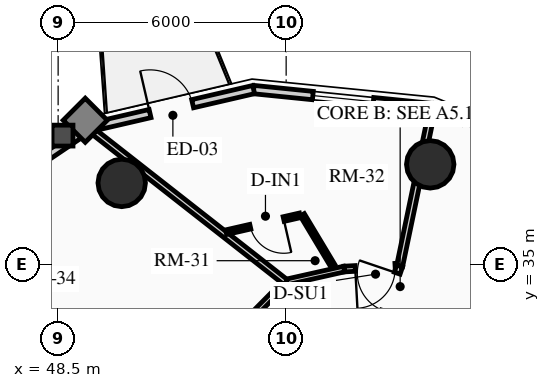
"""IFC4 building model, lengths in metres.
Left out: names, types, materials, properties, quantities, classifications, styles, units other than length and angle.
Written with IfcOpenShell. Run it as: python <this file> out.ifc"""

import sys

from ifc_helpers import new_model, si_unit, direction, frame, frame_2d, origin, origin_2d, place, context, subcontext, project, spatial, rectangle, circle, extrude, source, transform, mapped, element, fill, save


model = new_model("IFC4")
c1 = context("Model", 3, precision=1e-05, world=origin(), true_north=direction((0.0, 1.0)))
c2 = subcontext(c1, "Body", "Model", "MODEL_VIEW")
j1 = project(units=[si_unit("LENGTHUNIT", "METRE"), si_unit("PLANEANGLEUNIT", "RADIAN")], contexts=[c1])
p1 = place(None, origin())
s1 = spatial("IfcSite", under=j1, at=p1, CompositionType="ELEMENT")
p2 = place(p1, origin())
s2 = spatial("IfcBuilding", under=s1, at=p2, CompositionType="ELEMENT")
p3 = place(p2, frame((0.0, 0.0, 177.79)))
s3 = spatial("IfcBuildingStorey", under=s2, at=p3, CompositionType="ELEMENT", Elevation=177.79)
for number, where, z_axis, x_axis in (
    (1, (58.291, 37.635, 0.0), (0.0, 0.0, 1.0), (1.0, 0.0, 0.0)),
    (2, (50.173, 37.146, 0.0), (0.0, 0.0, 1.0), (1.0, 0.0, 0.0)),
):
    element("IfcColumn", number, at=place(p3, frame(where, z_axis=z_axis, x_axis=x_axis)), inside=s3, PredefinedType="USERDEFINED", context=c2, shape_type="SweptSolid", body=[
        extrude(circle(Radius=0.625, at=origin_2d()), origin(), (0.0, 0.0, 1.0), 2.91),
    ])
p4 = place(p3, frame((58.354, 39.127, 0.0), z_axis=(0.0, 0.0, 1.0), x_axis=(0.924556017656, -0.381046152345, 0.0)))
e3 = element("IfcWall", 3, at=p4, inside=s3, PredefinedType="SOLIDWALL", context=c2, shape_type="SweptSolid", body=[
    extrude(rectangle(XDim=0.87, YDim=0.22, at=frame_2d((0.435, 0.0))), origin(), (0.0, 0.0, 1.0), 2.245),
])
p5 = place(p3, frame((53.645, 39.603, 0.0), z_axis=(0.0, 0.0, 1.0), x_axis=(0.994943283129, -0.100438356004, 0.0)))
e4 = element("IfcWall", 4, at=p5, inside=s3, PredefinedType="SOLIDWALL", context=c2, shape_type="SweptSolid", body=[
    extrude(rectangle(XDim=4.733, YDim=0.22, at=frame_2d((2.366, 0.0))), origin(), (0.0, 0.0, 1.0), 2.245),
])
m1 = source(origin(), c2, "Body", "SweptSolid", [
    extrude(rectangle(XDim=1.6, YDim=1.3, at=frame_2d((0.8, 0.65))), frame((0.0, 0.12, 0.0), z_axis=(0.0, -1.0, 0.0), x_axis=(1.0, 0.0, 0.0)), (0.0, 0.0, 1.0), 0.24),
])
p6 = place(p5, frame((1.566, 0.0, 0.65)))
e5 = element("IfcOpeningElement", 5, at=p6, cuts=e4, PredefinedType="OPENING", context=c2, shape_type="MappedRepresentation", body=[
    mapped(m1, transform((0.0, 0.0, 0.0), x_axis=(1.0, 0.0, 0.0), y_axis=(0.0, 1.0, 0.0), z_axis=(0.0, 0.0, 1.0), scale=1.0)),
])
p7 = place(p3, frame((49.313, 38.6, 0.0), z_axis=(0.0, 0.0, 1.0), x_axis=(0.97422620202, 0.22557328587, 0.0)))
e6 = element("IfcWall", 6, at=p7, inside=s3, PredefinedType="SOLIDWALL", context=c2, shape_type="SweptSolid", body=[
    extrude(rectangle(XDim=4.446, YDim=0.22, at=frame_2d((2.223, 0.0))), origin(), (0.0, 0.0, 1.0), 2.245),
])
m2 = source(origin(), c2, "Body", "SweptSolid", [
    extrude(rectangle(XDim=1.15, YDim=2.005, at=frame_2d((0.575, 1.002))), frame((0.0, 0.12, 0.0), z_axis=(0.0, -1.0, 0.0), x_axis=(1.0, 0.0, 0.0)), (0.0, 0.0, 1.0), 0.24),
])
p8 = place(p7, frame((1.648, 0.0, 0.0)))
e7 = element("IfcOpeningElement", 7, at=p8, cuts=e6, PredefinedType="OPENING", context=c2, shape_type="MappedRepresentation", body=[
    mapped(m2, transform((0.0, 0.0, 0.0), x_axis=(1.0, 0.0, 0.0), y_axis=(0.0, 1.0, 0.0), z_axis=(0.0, 0.0, 1.0), scale=1.0)),
])
p9 = place(p3, frame((45.783, 36.217, 0.0), z_axis=(0.0, 0.0, 1.0), x_axis=(0.828817439852, 0.55951912514, 0.0)))
e8 = element("IfcWall", 8, at=p9, inside=s3, PredefinedType="SOLIDWALL", context=c2, shape_type="SweptSolid", body=[
    extrude(rectangle(XDim=4.259, YDim=0.22, at=frame_2d((2.129, 0.0))), origin(), (0.0, 0.0, 1.0), 2.245),
])
p10 = place(p3, frame((57.486, 34.96, 0.0), z_axis=(0.0, 0.0, 1.0), x_axis=(-0.998483871836, -0.055045051404, 0.0)))
e9 = element("IfcWall", 9, at=p10, inside=s3, PredefinedType="PARTITIONING", context=c2, shape_type="SweptSolid", body=[
    extrude(rectangle(XDim=1.464, YDim=0.15, at=frame_2d((0.732, 0.0))), origin(), (0.0, 0.0, 1.0), 2.245),
])
m3 = source(origin(), c2, "Body", "SweptSolid", [
    extrude(rectangle(XDim=1.05, YDim=2.015, at=frame_2d((0.525, 1.007))), frame((0.0, 0.085, 0.0), z_axis=(0.0, -1.0, 0.0), x_axis=(1.0, 0.0, 0.0)), (0.0, 0.0, 1.0), 0.17),
])
p11 = place(p10, frame((0.12, 0.0, 0.0)))
e10 = element("IfcOpeningElement", 10, at=p11, cuts=e9, PredefinedType="OPENING", context=c2, shape_type="MappedRepresentation", body=[
    mapped(m3, transform((0.0, 0.0, 0.0), x_axis=(1.0, 0.0, 0.0), y_axis=(0.0, 1.0, 0.0), z_axis=(0.0, 0.0, 1.0), scale=1.0)),
])
p12 = place(p3, frame((56.025, 34.88, 0.0), z_axis=(0.0, 0.0, 1.0), x_axis=(-0.975729093394, -0.218981132301, 0.0)))
e11 = element("IfcWall", 11, at=p12, inside=s3, PredefinedType="PARTITIONING", context=c2, shape_type="SweptSolid", body=[
    extrude(rectangle(XDim=1.575, YDim=0.15, at=frame_2d((0.788, 0.0))), origin(), (0.0, 0.0, 1.0), 2.245),
])
p13 = place(p3, frame((54.488, 34.535, 0.0), z_axis=(0.0, 0.0, 1.0), x_axis=(-0.703666289339, -0.710530613871, 0.0)))
e12 = element("IfcWall", 12, at=p13, inside=s3, PredefinedType="PARTITIONING", context=c2, shape_type="SweptSolid", body=[
    extrude(rectangle(XDim=3.343, YDim=0.15, at=frame_2d((1.672, 0.0))), origin(), (0.0, 0.0, 1.0), 2.245),
])
p14 = place(p13, frame((1.66, 0.0, 0.0)))
e13 = element("IfcOpeningElement", 13, at=p14, cuts=e12, PredefinedType="OPENING", context=c2, shape_type="MappedRepresentation", body=[
    mapped(m3, transform((0.0, 0.0, 0.0), x_axis=(1.0, 0.0, 0.0), y_axis=(0.0, 1.0, 0.0), z_axis=(0.0, 0.0, 1.0), scale=1.0)),
])
p15 = place(p3, frame((57.486, 34.96, 0.0), z_axis=(0.0, 0.0, 1.0), x_axis=(0.204011788318, 0.978968431681, 0.0)))
e14 = element("IfcWall", 14, at=p15, inside=s3, PredefinedType="PARTITIONING", context=c2, shape_type="SweptSolid", body=[
    extrude(rectangle(XDim=4.236, YDim=0.16, at=frame_2d((2.118, 0.0))), origin(), (0.0, 0.0, 1.0), 2.245),
])
p16 = place(p3, frame((54.488, 34.535, 0.0), z_axis=(0.0, 0.0, 1.0), x_axis=(-0.787155500995, 0.616754584298, 0.0)))
e15 = element("IfcWall", 15, at=p16, inside=s3, PredefinedType="PARTITIONING", context=c2, shape_type="SweptSolid", body=[
    extrude(rectangle(XDim=6.562, YDim=0.16, at=frame_2d((3.281, 0.0))), origin(), (0.0, 0.0, 1.0), 2.245),
])
p17 = place(p3, frame((56.828, 33.021, 0.0), z_axis=(0.0, 0.0, 1.0), x_axis=(0.321300161671, 0.94697740528, 0.0)))
e16 = element("IfcWall", 16, at=p17, inside=s3, PredefinedType="PARTITIONING", context=c2, shape_type="SweptSolid", body=[
    extrude(rectangle(XDim=2.049, YDim=0.16, at=frame_2d((1.024, 0.0))), origin(), (0.0, 0.0, 1.0), 2.245),
])
m4 = source(origin(), c2, "Body", "SweptSolid", [
    extrude(rectangle(XDim=1.05, YDim=2.015, at=frame_2d((0.525, 1.007))), frame((0.0, 0.09, 0.0), z_axis=(0.0, -1.0, 0.0), x_axis=(1.0, 0.0, 0.0)), (0.0, 0.0, 1.0), 0.18),
])
p18 = place(p17, frame((0.798, 0.0, 0.0)))
e17 = element("IfcOpeningElement", 17, at=p18, cuts=e16, PredefinedType="OPENING", context=c2, shape_type="MappedRepresentation", body=[
    mapped(m4, transform((0.0, 0.0, 0.0), x_axis=(1.0, 0.0, 0.0), y_axis=(0.0, 1.0, 0.0), z_axis=(0.0, 0.0, 1.0), scale=1.0)),
])
p19 = place(p3, frame((55.727, 34.97, 0.0), z_axis=(0.0, 0.0, 1.0), x_axis=(-0.514518774568, 0.857479113808, 0.0)))
e18 = element("IfcWall", 18, at=p19, inside=s3, PredefinedType="PARTITIONING", context=c2, shape_type="SweptSolid", body=[
    extrude(rectangle(XDim=1.56, YDim=0.125, at=frame_2d((0.78, 0.0))), origin(), (0.0, 0.0, 1.0), 2.245),
])
p20 = place(p3, frame((54.864, 36.293, 0.0), z_axis=(0.0, 0.0, 1.0), x_axis=(-0.974875983782, -0.222748324896, 0.0)))
e19 = element("IfcWall", 19, at=p20, inside=s3, PredefinedType="PARTITIONING", context=c2, shape_type="SweptSolid", body=[
    extrude(rectangle(XDim=1.994, YDim=0.125, at=frame_2d((0.997, 0.0))), origin(), (0.0, 0.0, 1.0), 2.675),
])
m5 = source(origin(), c2, "Body", "SweptSolid", [
    extrude(rectangle(XDim=0.9, YDim=2.005, at=frame_2d((0.45, 1.002))), frame((0.0, 0.073, 0.0), z_axis=(0.0, -1.0, 0.0), x_axis=(1.0, 0.0, 0.0)), (0.0, 0.0, 1.0), 0.145),
])
p21 = place(p20, frame((0.44, 0.0, 0.0)))
e20 = element("IfcOpeningElement", 20, at=p21, cuts=e19, PredefinedType="OPENING", context=c2, shape_type="MappedRepresentation", body=[
    mapped(m5, transform((0.0, 0.0, 0.0), x_axis=(1.0, 0.0, 0.0), y_axis=(0.0, 1.0, 0.0), z_axis=(0.0, 0.0, 1.0), scale=1.0)),
])
m6 = source(origin(), c2, "Body", "SweptSolid", [
    extrude(rectangle(XDim=1.6, YDim=1.3, at=frame_2d((0.8, 0.65))), frame((0.0, 0.03, 0.0), z_axis=(0.0, -1.0, 0.0), x_axis=(1.0, 0.0, 0.0)), (0.0, 0.0, 1.0), 0.06),
])
p22 = place(p6, origin())
e21 = element("IfcWindow", 21, at=p22, inside=s3, PartitioningType="SINGLE_PANEL", PredefinedType="WINDOW", context=c2, shape_type="MappedRepresentation", body=[
    mapped(m6, transform((0.0, 0.0, 0.0), x_axis=(1.0, 0.0, 0.0), y_axis=(0.0, 1.0, 0.0), z_axis=(0.0, 0.0, 1.0), scale=1.0)),
])
fill(e5, e21)
m7 = source(origin(), c2, "Body", "SweptSolid", [
    extrude(rectangle(XDim=1.15, YDim=2.005, at=frame_2d((0.575, 1.002))), frame((0.0, 0.025, 0.0), z_axis=(0.0, -1.0, 0.0), x_axis=(1.0, 0.0, 0.0)), (0.0, 0.0, 1.0), 0.05),
])
p23 = place(p8, origin())
e22 = element("IfcDoor", 22, at=p23, inside=s3, OperationType="SINGLE_SWING_LEFT", PredefinedType="DOOR", context=c2, shape_type="MappedRepresentation", body=[
    mapped(m7, transform((0.0, 0.0, 0.0), x_axis=(1.0, 0.0, 0.0), y_axis=(0.0, 1.0, 0.0), z_axis=(0.0, 0.0, 1.0), scale=1.0)),
])
fill(e7, e22)
m8 = source(origin(), c2, "Body", "SweptSolid", [
    extrude(rectangle(XDim=1.05, YDim=2.015, at=frame_2d((0.525, 1.007))), frame((0.0, 0.025, 0.0), z_axis=(0.0, -1.0, 0.0), x_axis=(1.0, 0.0, 0.0)), (0.0, 0.0, 1.0), 0.05),
])
p24 = place(p18, origin())
e23 = element("IfcDoor", 23, at=p24, inside=s3, OperationType="SINGLE_SWING_RIGHT", PredefinedType="DOOR", context=c2, shape_type="MappedRepresentation", body=[
    mapped(m8, transform((0.0, 0.0, 0.0), x_axis=(1.0, 0.0, 0.0), y_axis=(0.0, 1.0, 0.0), z_axis=(0.0, 0.0, 1.0), scale=1.0)),
])
fill(e17, e23)
p25 = place(p11, origin())
e24 = element("IfcDoor", 24, at=p25, inside=s3, OperationType="SINGLE_SWING_RIGHT", PredefinedType="DOOR", context=c2, shape_type="MappedRepresentation", body=[
    mapped(m8, transform((0.0, 0.0, 0.0), x_axis=(1.0, 0.0, 0.0), y_axis=(0.0, 1.0, 0.0), z_axis=(0.0, 0.0, 1.0), scale=1.0)),
])
fill(e10, e24)
m9 = source(origin(), c2, "Body", "SweptSolid", [
    extrude(rectangle(XDim=0.9, YDim=2.005, at=frame_2d((0.45, 1.002))), frame((0.0, 0.025, 0.0), z_axis=(0.0, -1.0, 0.0), x_axis=(1.0, 0.0, 0.0)), (0.0, 0.0, 1.0), 0.05),
])
p26 = place(p21, origin())
e25 = element("IfcDoor", 25, at=p26, inside=s3, OperationType="SINGLE_SWING_LEFT", PredefinedType="DOOR", context=c2, shape_type="MappedRepresentation", body=[
    mapped(m9, transform((0.0, 0.0, 0.0), x_axis=(1.0, 0.0, 0.0), y_axis=(0.0, 1.0, 0.0), z_axis=(0.0, 0.0, 1.0), scale=1.0)),
])
fill(e20, e25)
save(model, sys.argv[1])
